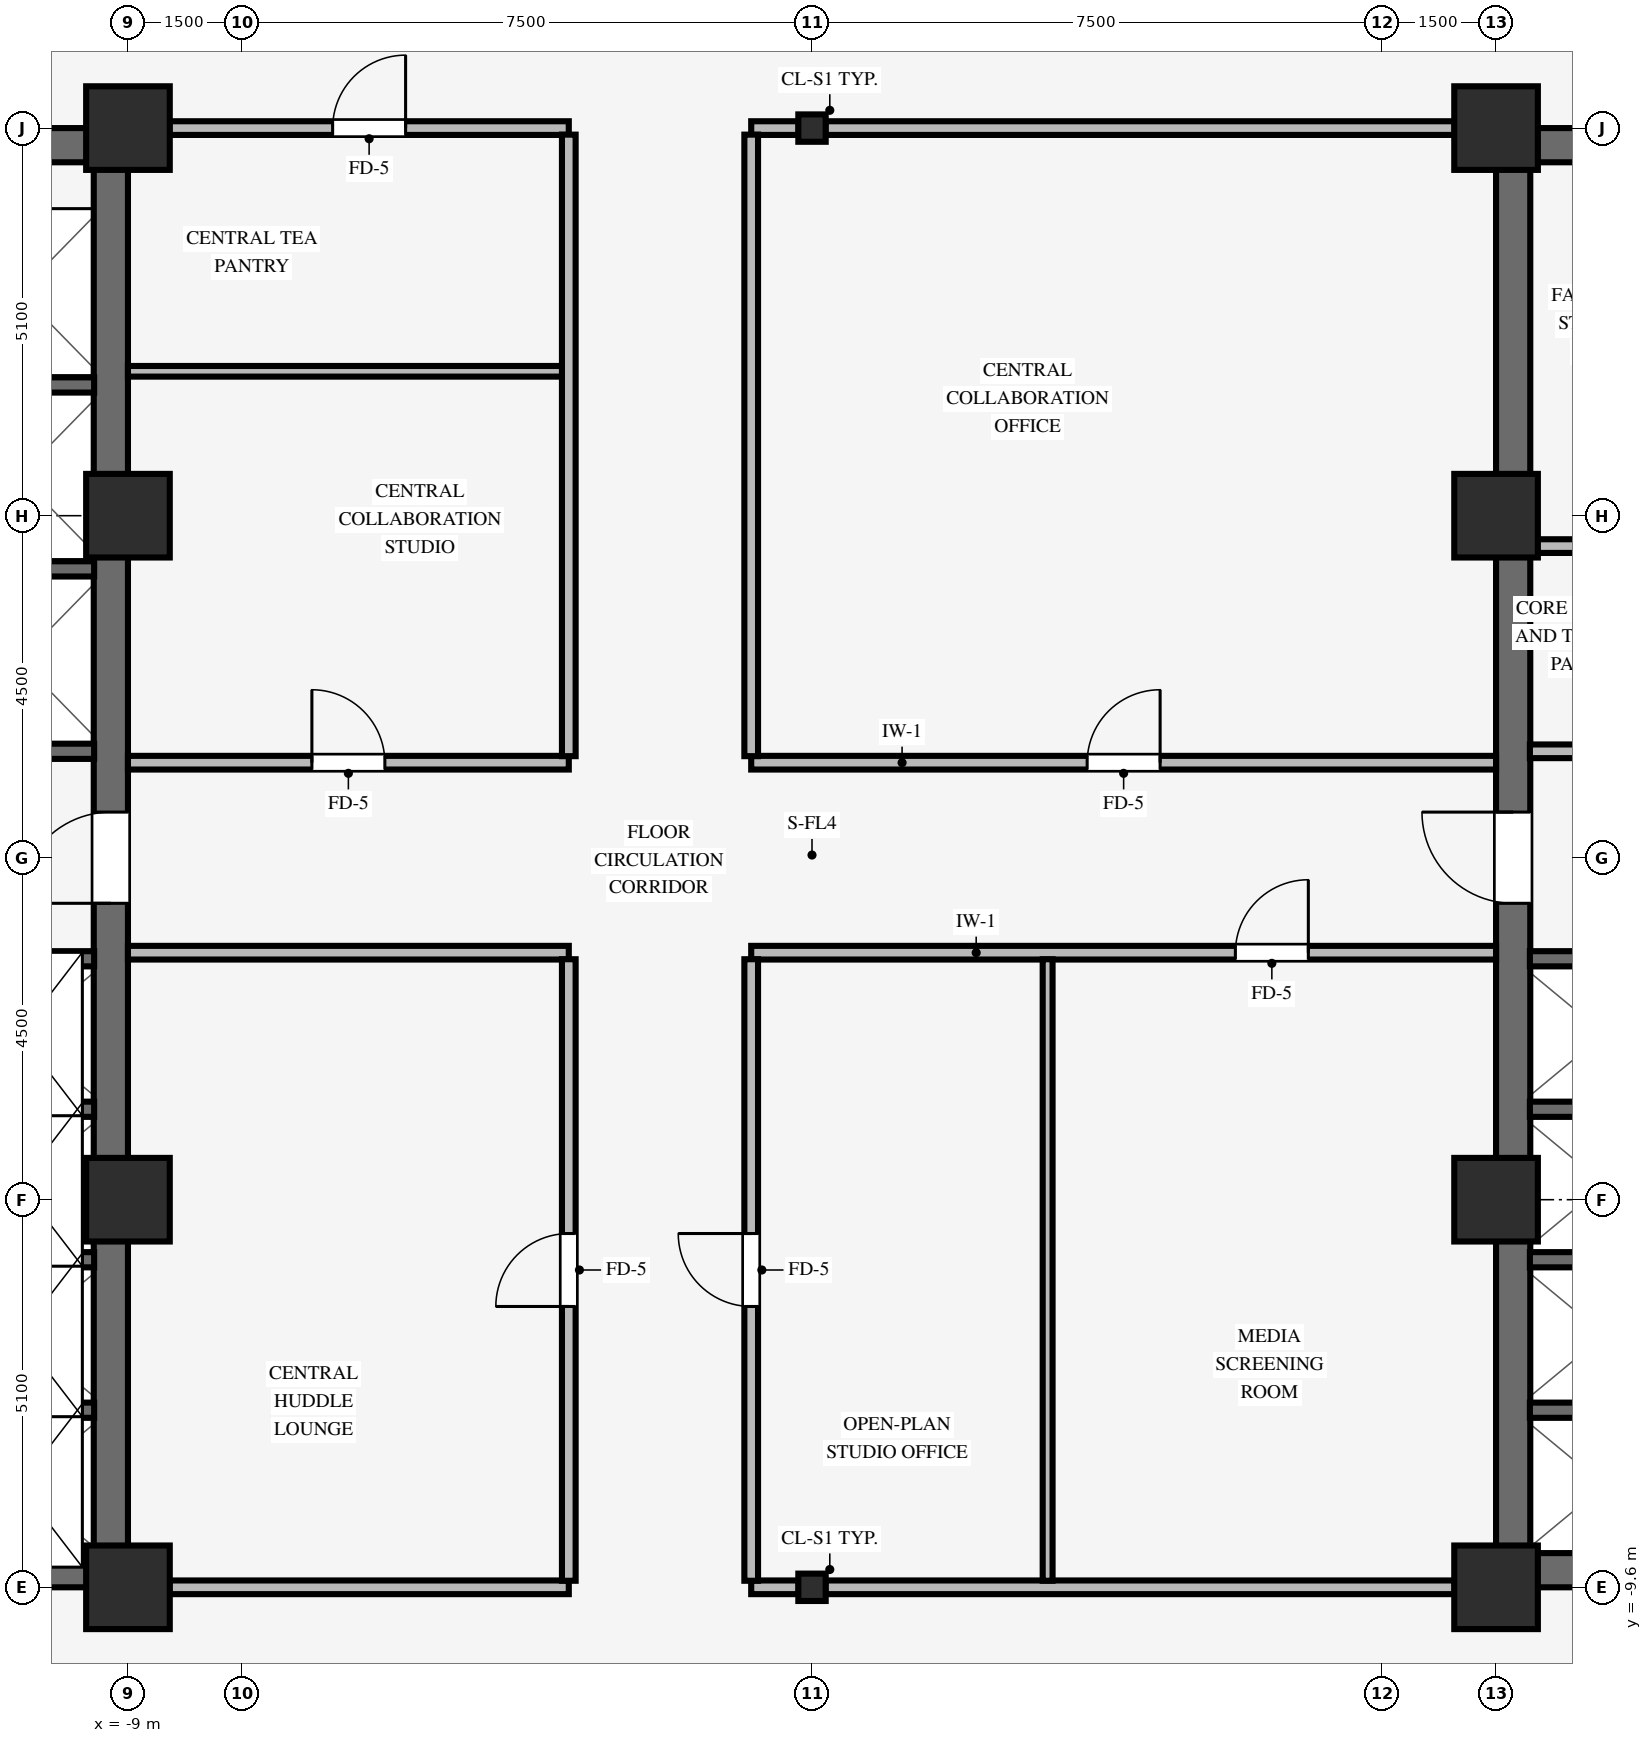
"""IFC4 building model, lengths in metres.
Left out: names, types, materials, properties, quantities, classifications, styles, units other than length and angle.
Written with IfcOpenShell. Run it as: python <this file> out.ifc"""

import sys

from ifc_helpers import new_model, si_unit, direction, frame, frame_2d, origin, origin_2d, place, context, subcontext, project, spatial, rectangle, i_section, extrude, source, transform, mapped, element, fill, save


model = new_model("IFC4")
c1 = context("Model", 3, precision=1e-05, world=origin(), true_north=direction((0.0, 1.0)))
c2 = subcontext(c1, "Body", "Model", "MODEL_VIEW")
j1 = project(units=[si_unit("LENGTHUNIT", "METRE"), si_unit("PLANEANGLEUNIT", "RADIAN")], contexts=[c1])
p1 = place(None, origin())
s1 = spatial("IfcSite", under=j1, at=p1, CompositionType="ELEMENT")
p2 = place(p1, origin())
s2 = spatial("IfcBuilding", under=s1, at=p2, CompositionType="ELEMENT")
p3 = place(p2, frame((0.0, 0.0, 60.45)))
s3 = spatial("IfcBuildingStorey", under=s2, at=p3, CompositionType="ELEMENT", Elevation=60.45)
for number, where, z_axis, x_axis in (
    (1, (-17.5, -9.375, 0.0), (0.0, 0.0, 1.0), (1.0, 0.0, 0.0)),
    (2, (-17.5, 9.375, 0.0), (0.0, 0.0, 1.0), (1.0, 0.0, 0.0)),
):
    element("IfcWall", number, at=place(p3, frame(where, z_axis=z_axis, x_axis=x_axis)), inside=s3, PredefinedType="SHEAR", context=c2, shape_type="SweptSolid", body=[
        extrude(rectangle(XDim=8.5, YDim=0.45, at=frame_2d((4.25, 0.0))), origin(), (0.0, 0.0, 1.0), 3.37),
    ])
p4 = place(p3, frame((-9.225, -9.155, 0.0), z_axis=(0.0, 0.0, 1.0), x_axis=(0.0, 1.0, 0.0)))
e3 = element("IfcWall", 3, at=p4, inside=s3, PredefinedType="SHEAR", context=c2, shape_type="SweptSolid", body=[
    extrude(rectangle(XDim=18.31, YDim=0.45, at=frame_2d((9.155, 0.0))), origin(), (0.0, 0.0, 1.0), 3.37),
])
p5 = place(p4, frame((8.555, 0.0, 0.0)))
e4 = element("IfcOpeningElement", 4, at=p5, cuts=e3, PredefinedType="OPENING", context=c2, shape_type="SweptSolid", body=[
    extrude(rectangle(XDim=1.2, YDim=2.15, at=frame_2d((0.6, 1.075))), frame((0.0, 0.235, 0.0), z_axis=(0.0, -1.0, 0.0), x_axis=(1.0, 0.0, 0.0)), (0.0, 0.0, 1.0), 0.47),
])
for number, where, z_axis, x_axis in (
    (5, (9.0, -9.375, 0.0), (0.0, 0.0, 1.0), (1.0, 0.0, 0.0)),
    (6, (9.0, 9.375, 0.0), (0.0, 0.0, 1.0), (1.0, 0.0, 0.0)),
):
    element("IfcWall", number, at=place(p3, frame(where, z_axis=z_axis, x_axis=x_axis)), inside=s3, PredefinedType="SHEAR", context=c2, shape_type="SweptSolid", body=[
        extrude(rectangle(XDim=8.5, YDim=0.45, at=frame_2d((4.25, 0.0))), origin(), (0.0, 0.0, 1.0), 3.37),
    ])
p6 = place(p3, frame((9.225, -9.155, 0.0), z_axis=(0.0, 0.0, 1.0), x_axis=(0.0, 1.0, 0.0)))
e7 = element("IfcWall", 7, at=p6, inside=s3, PredefinedType="SHEAR", context=c2, shape_type="SweptSolid", body=[
    extrude(rectangle(XDim=18.31, YDim=0.45, at=frame_2d((9.155, 0.0))), origin(), (0.0, 0.0, 1.0), 3.37),
])
p7 = place(p6, frame((8.555, 0.0, 0.0)))
e8 = element("IfcOpeningElement", 8, at=p7, cuts=e7, PredefinedType="OPENING", context=c2, shape_type="SweptSolid", body=[
    extrude(rectangle(XDim=1.2, YDim=2.15, at=frame_2d((0.6, 1.075))), frame((0.0, 0.235, 0.0), z_axis=(0.0, -1.0, 0.0), x_axis=(1.0, 0.0, 0.0)), (0.0, 0.0, 1.0), 0.47),
])
for number, where, z_axis, x_axis in (
    (9, (-9.0, -9.6, 0.0), (0.0, 0.0, 1.0), (1.0, 0.0, 0.0)),
    (10, (-9.0, -4.5, 0.0), (0.0, 0.0, 1.0), (1.0, 0.0, 0.0)),
    (11, (-9.0, 4.5, 0.0), (0.0, 0.0, 1.0), (1.0, 0.0, 0.0)),
    (12, (-9.0, 9.6, 0.0), (0.0, 0.0, 1.0), (1.0, 0.0, 0.0)),
    (13, (9.0, -9.6, 0.0), (0.0, 0.0, 1.0), (1.0, 0.0, 0.0)),
    (14, (9.0, -4.5, 0.0), (0.0, 0.0, 1.0), (1.0, 0.0, 0.0)),
    (15, (9.0, 4.5, 0.0), (0.0, 0.0, 1.0), (1.0, 0.0, 0.0)),
    (16, (9.0, 9.6, 0.0), (0.0, 0.0, 1.0), (1.0, 0.0, 0.0)),
):
    element("IfcColumn", number, at=place(p3, frame(where, z_axis=z_axis, x_axis=x_axis)), inside=s3, PredefinedType="COLUMN", context=c2, shape_type="SweptSolid", body=[
        extrude(rectangle(XDim=1.1, YDim=1.1, at=origin_2d()), origin(), (0.0, 0.0, 1.0), 3.37),
    ])
for number, where, z_axis, x_axis in (
    (17, (0.0, -9.6, 0.0), (0.0, 0.0, 1.0), (1.0, 0.0, 0.0)),
    (18, (0.0, 9.6, 0.0), (0.0, 0.0, 1.0), (1.0, 0.0, 0.0)),
):
    element("IfcColumn", number, at=place(p3, frame(where, z_axis=z_axis, x_axis=x_axis)), inside=s3, PredefinedType="COLUMN", context=c2, shape_type="SweptSolid", body=[
        extrude(i_section(OverallWidth=0.36, OverallDepth=0.36, WebThickness=0.021, FlangeThickness=0.021, FilletRadius=0.018, at=origin_2d()), origin(), (0.0, 0.0, 1.0), 3.37),
    ])
for number, where, z_axis, x_axis in (
    (19, (-11.505, -7.27, 0.0), (0.0, 0.0, 1.0), (1.0, 0.0, 0.0)),
    (20, (-11.505, -5.29, 0.0), (0.0, 0.0, 1.0), (1.0, 0.0, 0.0)),
    (21, (-11.505, -3.31, 0.0), (0.0, 0.0, 1.0), (1.0, 0.0, 0.0)),
    (22, (-11.505, -1.33, 0.0), (0.0, 0.0, 1.0), (1.0, 0.0, 0.0)),
    (23, (-11.505, 1.4, 0.0), (0.0, 0.0, 1.0), (1.0, 0.0, 0.0)),
    (24, (-11.505, 3.8, 0.0), (0.0, 0.0, 1.0), (1.0, 0.0, 0.0)),
    (25, (-11.505, 6.22, 0.0), (0.0, 0.0, 1.0), (1.0, 0.0, 0.0)),
    (26, (9.445, -7.27, 0.0), (0.0, 0.0, 1.0), (1.0, 0.0, 0.0)),
    (27, (9.445, -5.29, 0.0), (0.0, 0.0, 1.0), (1.0, 0.0, 0.0)),
    (28, (9.445, -3.31, 0.0), (0.0, 0.0, 1.0), (1.0, 0.0, 0.0)),
    (29, (9.445, -1.33, 0.0), (0.0, 0.0, 1.0), (1.0, 0.0, 0.0)),
):
    element("IfcWall", number, at=place(p3, frame(where, z_axis=z_axis, x_axis=x_axis)), inside=s3, PredefinedType="SHEAR", context=c2, shape_type="SweptSolid", body=[
        extrude(rectangle(XDim=2.06, YDim=0.2, at=frame_2d((1.03, 0.0))), origin(), (0.0, 0.0, 1.0), 3.37),
    ])
p8 = place(p3, frame((9.445, 1.4, 0.0), z_axis=(0.0, 0.0, 1.0), x_axis=(1.0, 0.0, 0.0)))
e30 = element("IfcWall", 30, at=p8, inside=s3, PredefinedType="PARTITIONING", context=c2, shape_type="SweptSolid", body=[
    extrude(rectangle(XDim=3.9, YDim=0.18, at=frame_2d((1.95, 0.0))), origin(), (0.0, 0.0, 1.0), 3.36),
])
p9 = place(p8, frame((2.315, 0.0, 0.0)))
e31 = element("IfcOpeningElement", 31, at=p9, cuts=e30, PredefinedType="OPENING", context=c2, shape_type="SweptSolid", body=[
    extrude(rectangle(XDim=0.88, YDim=2.1, at=frame_2d((0.44, 1.05))), frame((0.0, 0.1, 0.0), z_axis=(0.0, -1.0, 0.0), x_axis=(1.0, 0.0, 0.0)), (0.0, 0.0, 1.0), 0.2),
])
p10 = place(p3, frame((9.445, 4.1, 0.0), z_axis=(0.0, 0.0, 1.0), x_axis=(1.0, 0.0, 0.0)))
e32 = element("IfcWall", 32, at=p10, inside=s3, PredefinedType="PARTITIONING", context=c2, shape_type="SweptSolid", body=[
    extrude(rectangle(XDim=3.9, YDim=0.18, at=frame_2d((1.95, 0.0))), origin(), (0.0, 0.0, 1.0), 3.36),
])
p11 = place(p10, frame((0.8, 0.0, 0.0)))
e33 = element("IfcOpeningElement", 33, at=p11, cuts=e32, PredefinedType="OPENING", context=c2, shape_type="SweptSolid", body=[
    extrude(rectangle(XDim=0.88, YDim=2.1, at=frame_2d((0.44, 1.05))), frame((0.0, 0.1, 0.0), z_axis=(0.0, -1.0, 0.0), x_axis=(1.0, 0.0, 0.0)), (0.0, 0.0, 1.0), 0.2),
])
p12 = place(p10, frame((2.565, 0.0, 0.0)))
e34 = element("IfcOpeningElement", 34, at=p12, cuts=e32, PredefinedType="OPENING", context=c2, shape_type="SweptSolid", body=[
    extrude(rectangle(XDim=0.88, YDim=2.1, at=frame_2d((0.44, 1.05))), frame((0.0, 0.1, 0.0), z_axis=(0.0, -1.0, 0.0), x_axis=(1.0, 0.0, 0.0)), (0.0, 0.0, 1.0), 0.2),
])
p13 = place(p3, frame((-8.454, -9.6, 0.0), z_axis=(0.0, 0.0, 1.0), x_axis=(1.0, 0.0, 0.0)))
e35 = element("IfcWall", 35, at=p13, inside=s3, PredefinedType="PARTITIONING", context=c2, shape_type="SweptSolid", body=[
    extrude(rectangle(XDim=5.254, YDim=0.18, at=frame_2d((2.627, 0.0))), origin(), (0.0, 0.0, 1.0), 2.405),
])
p14 = place(p3, frame((-0.8, -9.6, 0.0), z_axis=(0.0, 0.0, 1.0), x_axis=(1.0, 0.0, 0.0)))
e36 = element("IfcWall", 36, at=p14, inside=s3, PredefinedType="PARTITIONING", context=c2, shape_type="SweptSolid", body=[
    extrude(rectangle(XDim=0.624, YDim=0.18, at=frame_2d((0.312, 0.0))), origin(), (0.0, 0.0, 1.0), 2.405),
])
p15 = place(p3, frame((0.176, -9.6, 0.0), z_axis=(0.0, 0.0, 1.0), x_axis=(1.0, 0.0, 0.0)))
e37 = element("IfcWall", 37, at=p15, inside=s3, PredefinedType="PARTITIONING", context=c2, shape_type="SweptSolid", body=[
    extrude(rectangle(XDim=8.278, YDim=0.18, at=frame_2d((4.139, 0.0))), origin(), (0.0, 0.0, 1.0), 2.405),
])
p16 = place(p3, frame((-9.0, -1.25, 0.0), z_axis=(0.0, 0.0, 1.0), x_axis=(1.0, 0.0, 0.0)))
e38 = element("IfcWall", 38, at=p16, inside=s3, PredefinedType="PARTITIONING", context=c2, shape_type="SweptSolid", body=[
    extrude(rectangle(XDim=5.8, YDim=0.18, at=frame_2d((2.9, 0.0))), origin(), (0.0, 0.0, 1.0), 3.36),
])
p17 = place(p3, frame((-0.8, -1.25, 0.0), z_axis=(0.0, 0.0, 1.0), x_axis=(1.0, 0.0, 0.0)))
e39 = element("IfcWall", 39, at=p17, inside=s3, PredefinedType="PARTITIONING", context=c2, shape_type="SweptSolid", body=[
    extrude(rectangle(XDim=9.8, YDim=0.18, at=frame_2d((4.9, 0.0))), origin(), (0.0, 0.0, 1.0), 3.36),
])
p18 = place(p17, frame((6.37, 0.0, 0.0)))
e40 = element("IfcOpeningElement", 40, at=p18, cuts=e39, PredefinedType="OPENING", context=c2, shape_type="SweptSolid", body=[
    extrude(rectangle(XDim=0.96, YDim=2.1, at=frame_2d((0.48, 1.05))), frame((0.0, 0.1, 0.0), z_axis=(0.0, -1.0, 0.0), x_axis=(1.0, 0.0, 0.0)), (0.0, 0.0, 1.0), 0.2),
])
p19 = place(p3, frame((-9.0, 1.25, 0.0), z_axis=(0.0, 0.0, 1.0), x_axis=(1.0, 0.0, 0.0)))
e41 = element("IfcWall", 41, at=p19, inside=s3, PredefinedType="PARTITIONING", context=c2, shape_type="SweptSolid", body=[
    extrude(rectangle(XDim=5.8, YDim=0.18, at=frame_2d((2.9, 0.0))), origin(), (0.0, 0.0, 1.0), 3.36),
])
p20 = place(p19, frame((2.42, 0.0, 0.0)))
e42 = element("IfcOpeningElement", 42, at=p20, cuts=e41, PredefinedType="OPENING", context=c2, shape_type="SweptSolid", body=[
    extrude(rectangle(XDim=0.96, YDim=2.1, at=frame_2d((0.48, 1.05))), frame((0.0, 0.1, 0.0), z_axis=(0.0, -1.0, 0.0), x_axis=(1.0, 0.0, 0.0)), (0.0, 0.0, 1.0), 0.2),
])
p21 = place(p3, frame((-0.8, 1.25, 0.0), z_axis=(0.0, 0.0, 1.0), x_axis=(1.0, 0.0, 0.0)))
e43 = element("IfcWall", 43, at=p21, inside=s3, PredefinedType="PARTITIONING", context=c2, shape_type="SweptSolid", body=[
    extrude(rectangle(XDim=9.8, YDim=0.18, at=frame_2d((4.9, 0.0))), origin(), (0.0, 0.0, 1.0), 3.36),
])
p22 = place(p21, frame((4.42, 0.0, 0.0)))
e44 = element("IfcOpeningElement", 44, at=p22, cuts=e43, PredefinedType="OPENING", context=c2, shape_type="SweptSolid", body=[
    extrude(rectangle(XDim=0.96, YDim=2.1, at=frame_2d((0.48, 1.05))), frame((0.0, 0.1, 0.0), z_axis=(0.0, -1.0, 0.0), x_axis=(1.0, 0.0, 0.0)), (0.0, 0.0, 1.0), 0.2),
])
p23 = place(p3, frame((-9.0, 6.4, 0.0), z_axis=(0.0, 0.0, 1.0), x_axis=(1.0, 0.0, 0.0)))
e45 = element("IfcWall", 45, at=p23, inside=s3, PredefinedType="PARTITIONING", context=c2, shape_type="SweptSolid", body=[
    extrude(rectangle(XDim=5.714, YDim=0.14, at=frame_2d((2.857, 0.0))), origin(), (0.0, 0.0, 1.0), 3.36),
])
p24 = place(p3, frame((-8.454, 9.6, 0.0), z_axis=(0.0, 0.0, 1.0), x_axis=(1.0, 0.0, 0.0)))
e46 = element("IfcWall", 46, at=p24, inside=s3, PredefinedType="PARTITIONING", context=c2, shape_type="SweptSolid", body=[
    extrude(rectangle(XDim=5.254, YDim=0.18, at=frame_2d((2.627, 0.0))), origin(), (0.0, 0.0, 1.0), 2.405),
])
p25 = place(p24, frame((2.147, 0.0, 0.0)))
e47 = element("IfcOpeningElement", 47, at=p25, cuts=e46, PredefinedType="OPENING", context=c2, shape_type="SweptSolid", body=[
    extrude(rectangle(XDim=0.96, YDim=2.1, at=frame_2d((0.48, 1.05))), frame((0.0, 0.1, 0.0), z_axis=(0.0, -1.0, 0.0), x_axis=(1.0, 0.0, 0.0)), (0.0, 0.0, 1.0), 0.2),
])
p26 = place(p3, frame((-0.8, 9.6, 0.0), z_axis=(0.0, 0.0, 1.0), x_axis=(1.0, 0.0, 0.0)))
e48 = element("IfcWall", 48, at=p26, inside=s3, PredefinedType="PARTITIONING", context=c2, shape_type="SweptSolid", body=[
    extrude(rectangle(XDim=0.624, YDim=0.18, at=frame_2d((0.312, 0.0))), origin(), (0.0, 0.0, 1.0), 2.405),
])
p27 = place(p3, frame((0.176, 9.6, 0.0), z_axis=(0.0, 0.0, 1.0), x_axis=(1.0, 0.0, 0.0)))
e49 = element("IfcWall", 49, at=p27, inside=s3, PredefinedType="PARTITIONING", context=c2, shape_type="SweptSolid", body=[
    extrude(rectangle(XDim=8.278, YDim=0.18, at=frame_2d((4.139, 0.0))), origin(), (0.0, 0.0, 1.0), 2.405),
])
p28 = place(p3, frame((-3.2, -9.514, 0.0), z_axis=(0.0, 0.0, 1.0), x_axis=(0.0, 1.0, 0.0)))
e50 = element("IfcWall", 50, at=p28, inside=s3, PredefinedType="PARTITIONING", context=c2, shape_type="SweptSolid", body=[
    extrude(rectangle(XDim=8.178, YDim=0.18, at=frame_2d((4.089, 0.0))), origin(), (0.0, 0.0, 1.0), 3.36),
])
p29 = place(p28, frame((3.609, 0.0, 0.0)))
e51 = element("IfcOpeningElement", 51, at=p29, cuts=e50, PredefinedType="OPENING", context=c2, shape_type="SweptSolid", body=[
    extrude(rectangle(XDim=0.96, YDim=2.1, at=frame_2d((0.48, 1.05))), frame((0.0, 0.1, 0.0), z_axis=(0.0, -1.0, 0.0), x_axis=(1.0, 0.0, 0.0)), (0.0, 0.0, 1.0), 0.2),
])
p30 = place(p3, frame((-3.2, 1.336, 0.0), z_axis=(0.0, 0.0, 1.0), x_axis=(0.0, 1.0, 0.0)))
e52 = element("IfcWall", 52, at=p30, inside=s3, PredefinedType="PARTITIONING", context=c2, shape_type="SweptSolid", body=[
    extrude(rectangle(XDim=8.178, YDim=0.18, at=frame_2d((4.089, 0.0))), origin(), (0.0, 0.0, 1.0), 3.36),
])
p31 = place(p3, frame((-0.8, -9.514, 0.0), z_axis=(0.0, 0.0, 1.0), x_axis=(0.0, 1.0, 0.0)))
e53 = element("IfcWall", 53, at=p31, inside=s3, PredefinedType="PARTITIONING", context=c2, shape_type="SweptSolid", body=[
    extrude(rectangle(XDim=8.178, YDim=0.18, at=frame_2d((4.089, 0.0))), origin(), (0.0, 0.0, 1.0), 3.36),
])
p32 = place(p31, frame((3.609, 0.0, 0.0)))
e54 = element("IfcOpeningElement", 54, at=p32, cuts=e53, PredefinedType="OPENING", context=c2, shape_type="SweptSolid", body=[
    extrude(rectangle(XDim=0.96, YDim=2.1, at=frame_2d((0.48, 1.05))), frame((0.0, 0.1, 0.0), z_axis=(0.0, -1.0, 0.0), x_axis=(1.0, 0.0, 0.0)), (0.0, 0.0, 1.0), 0.2),
])
p33 = place(p3, frame((-0.8, 1.336, 0.0), z_axis=(0.0, 0.0, 1.0), x_axis=(0.0, 1.0, 0.0)))
e55 = element("IfcWall", 55, at=p33, inside=s3, PredefinedType="PARTITIONING", context=c2, shape_type="SweptSolid", body=[
    extrude(rectangle(XDim=8.178, YDim=0.18, at=frame_2d((4.089, 0.0))), origin(), (0.0, 0.0, 1.0), 3.36),
])
p34 = place(p3, frame((3.1, -9.514, 0.0), z_axis=(0.0, 0.0, 1.0), x_axis=(0.0, 1.0, 0.0)))
e56 = element("IfcWall", 56, at=p34, inside=s3, PredefinedType="PARTITIONING", context=c2, shape_type="SweptSolid", body=[
    extrude(rectangle(XDim=8.178, YDim=0.13, at=frame_2d((4.089, 0.0))), origin(), (0.0, 0.0, 1.0), 3.36),
])
m1 = source(origin(), c2, "Body", "SweptSolid", [
    extrude(rectangle(XDim=1.2, YDim=2.15, at=frame_2d((0.6, 1.075))), frame((0.0, 0.025, 0.0), z_axis=(0.0, -1.0, 0.0), x_axis=(1.0, 0.0, 0.0)), (0.0, 0.0, 1.0), 0.05),
])
p35 = place(p5, origin())
e57 = element("IfcDoor", 57, at=p35, inside=s3, OperationType="SINGLE_SWING_LEFT", PredefinedType="DOOR", context=c2, shape_type="MappedRepresentation", body=[
    mapped(m1, transform((0.0, 0.0, 0.0), scale=1.0)),
])
fill(e4, e57)
p36 = place(p7, origin())
e58 = element("IfcDoor", 58, at=p36, inside=s3, OperationType="SINGLE_SWING_RIGHT", PredefinedType="DOOR", context=c2, shape_type="MappedRepresentation", body=[
    mapped(m1, transform((0.0, 0.0, 0.0), scale=1.0)),
])
fill(e8, e58)
m2 = source(origin(), c2, "Body", "SweptSolid", [
    extrude(rectangle(XDim=0.96, YDim=2.1, at=frame_2d((0.48, 1.05))), frame((0.0, 0.025, 0.0), z_axis=(0.0, -1.0, 0.0), x_axis=(1.0, 0.0, 0.0)), (0.0, 0.0, 1.0), 0.05),
])
p37 = place(p22, origin())
e59 = element("IfcDoor", 59, at=p37, inside=s3, OperationType="SINGLE_SWING_RIGHT", PredefinedType="DOOR", context=c2, shape_type="MappedRepresentation", body=[
    mapped(m2, transform((0.0, 0.0, 0.0), scale=1.0)),
])
fill(e44, e59)
p38 = place(p29, origin())
e60 = element("IfcDoor", 60, at=p38, inside=s3, OperationType="SINGLE_SWING_LEFT", PredefinedType="DOOR", context=c2, shape_type="MappedRepresentation", body=[
    mapped(m2, transform((0.0, 0.0, 0.0), scale=1.0)),
])
fill(e51, e60)
p39 = place(p32, origin())
e61 = element("IfcDoor", 61, at=p39, inside=s3, OperationType="SINGLE_SWING_RIGHT", PredefinedType="DOOR", context=c2, shape_type="MappedRepresentation", body=[
    mapped(m2, transform((0.0, 0.0, 0.0), scale=1.0)),
])
fill(e54, e61)
p40 = place(p18, origin())
e62 = element("IfcDoor", 62, at=p40, inside=s3, OperationType="SINGLE_SWING_RIGHT", PredefinedType="DOOR", context=c2, shape_type="MappedRepresentation", body=[
    mapped(m2, transform((0.0, 0.0, 0.0), scale=1.0)),
])
fill(e40, e62)
p41 = place(p20, origin())
e63 = element("IfcDoor", 63, at=p41, inside=s3, OperationType="SINGLE_SWING_LEFT", PredefinedType="DOOR", context=c2, shape_type="MappedRepresentation", body=[
    mapped(m2, transform((0.0, 0.0, 0.0), scale=1.0)),
])
fill(e42, e63)
p42 = place(p25, origin())
e64 = element("IfcDoor", 64, at=p42, inside=s3, OperationType="SINGLE_SWING_RIGHT", PredefinedType="DOOR", context=c2, shape_type="MappedRepresentation", body=[
    mapped(m2, transform((0.0, 0.0, 0.0), scale=1.0)),
])
fill(e47, e64)
save(model, sys.argv[1])
